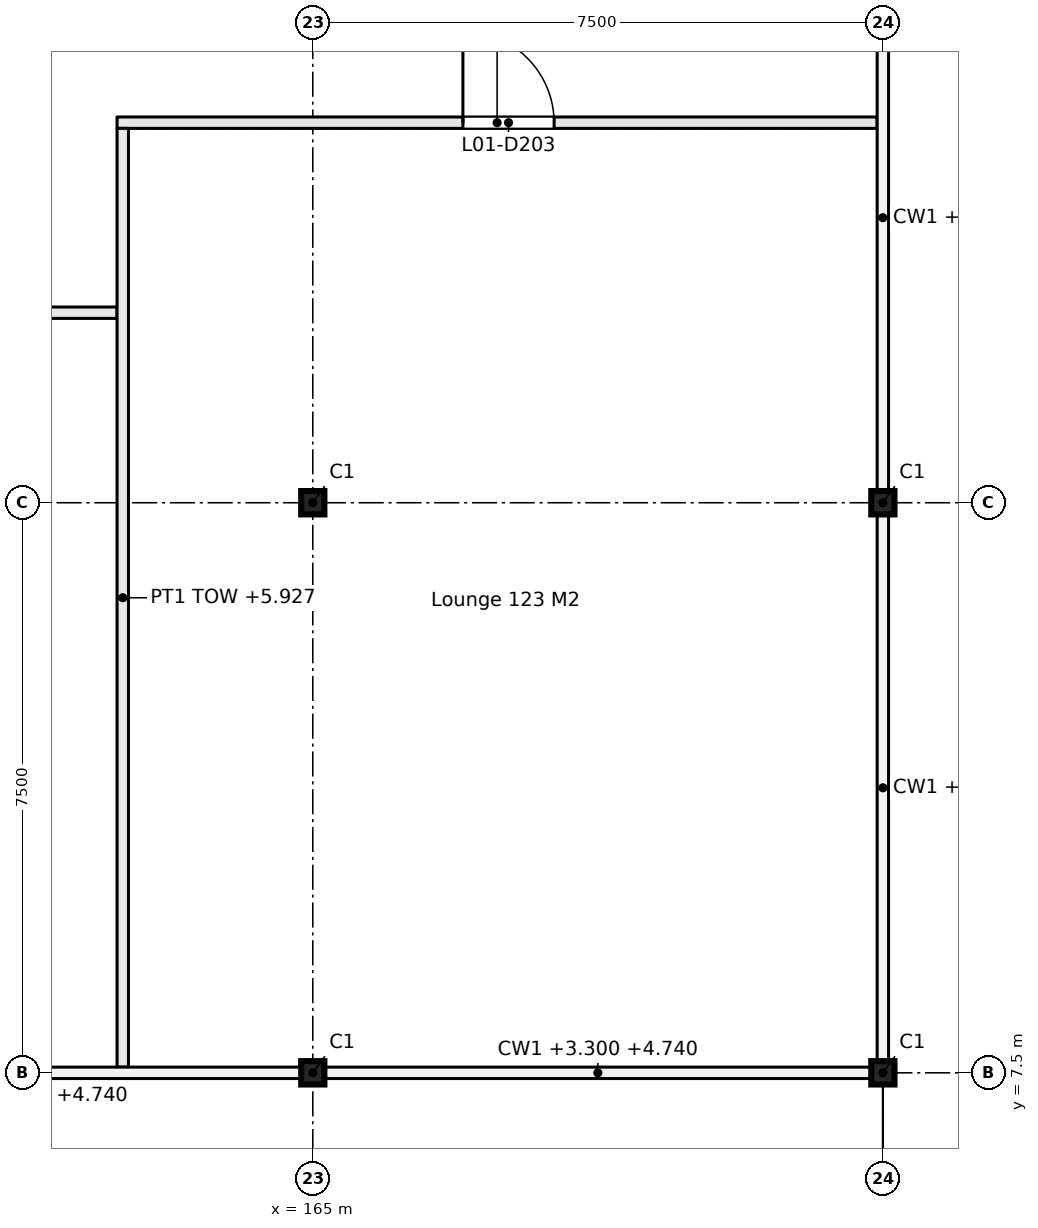
"""IFC4 building model, lengths in metres.
Left out: names, types, materials, properties, quantities, classifications, styles, units other than length and angle.
Written with IfcOpenShell. Run it as: python <this file> out.ifc"""

import sys

from ifc_helpers import new_model, si_unit, direction, frame, frame_2d, origin, origin_2d, place, context, subcontext, project, spatial, rectangle, i_section, extrude, element, fill, save


model = new_model("IFC4")
c1 = context("Model", 3, precision=1e-05, world=origin(), true_north=direction((0.0, 1.0)))
c2 = subcontext(c1, "Body", "Model", "MODEL_VIEW")
j1 = project(units=[si_unit("LENGTHUNIT", "METRE"), si_unit("PLANEANGLEUNIT", "RADIAN")], contexts=[c1])
p1 = place(None, origin())
s1 = spatial("IfcSite", under=j1, at=p1, CompositionType="ELEMENT")
p2 = place(p1, origin())
s2 = spatial("IfcBuilding", under=s1, at=p2, CompositionType="ELEMENT")
p3 = place(p2, frame((0.0, 0.0, 3.3)))
s3 = spatial("IfcBuildingStorey", under=s2, at=p3, CompositionType="ELEMENT", Elevation=3.3)
for number, where, z_axis, x_axis in (
    (1, (165.0, 7.5, 0.0), (0.0, 0.0, 1.0), (1.0, 0.0, 0.0)),
    (2, (165.0, 15.0, 0.0), (0.0, 0.0, 1.0), (1.0, 0.0, 0.0)),
    (3, (172.5, 7.5, 0.0), (0.0, 0.0, 1.0), (1.0, 0.0, 0.0)),
    (4, (172.5, 15.0, 0.0), (0.0, 0.0, 1.0), (1.0, 0.0, 0.0)),
):
    element("IfcColumn", number, at=place(p3, frame(where, z_axis=z_axis, x_axis=x_axis)), inside=s3, PredefinedType="COLUMN", context=c2, shape_type="SweptSolid", body=[
        extrude(i_section(OverallWidth=0.305, OverallDepth=0.307, WebThickness=0.01, FlangeThickness=0.015, FilletRadius=0.015, at=origin_2d()), origin(), (0.0, 0.0, 1.0), 3.3),
    ])
p4 = place(p3, frame((150.125, 17.5, 0.0), z_axis=(0.0, 0.0, 1.0), x_axis=(1.0, 0.0, 0.0)))
e5 = element("IfcWall", 5, at=p4, inside=s3, PredefinedType="PARTITIONING", context=c2, shape_type="SweptSolid", body=[
    extrude(rectangle(XDim=12.3, YDim=0.15, at=frame_2d((6.15, 0.0))), origin(), (0.0, 0.0, 1.0), 2.751),
])
p5 = place(p4, frame((5.425, 0.0, 0.0)))
e6 = element("IfcOpeningElement", 6, at=p5, cuts=e5, PredefinedType="OPENING", context=c2, shape_type="SweptSolid", body=[
    extrude(rectangle(XDim=1.2, YDim=2.1, at=frame_2d((0.6, 1.05))), frame((0.0, 0.085, 0.0), z_axis=(0.0, -1.0, 0.0), x_axis=(1.0, 0.0, 0.0)), (0.0, 0.0, 1.0), 0.17),
])
p6 = place(p3, frame((162.425, 20.0, 0.0), z_axis=(0.0, 0.0, 1.0), x_axis=(1.0, 0.0, 0.0)))
e7 = element("IfcWall", 7, at=p6, inside=s3, PredefinedType="PARTITIONING", context=c2, shape_type="SweptSolid", body=[
    extrude(rectangle(XDim=10.0, YDim=0.15, at=frame_2d((5.0, 0.0))), origin(), (0.0, 0.0, 1.0), 2.751),
])
p7 = place(p6, frame((4.55, 0.0, 0.0)))
e8 = element("IfcOpeningElement", 8, at=p7, cuts=e7, PredefinedType="OPENING", context=c2, shape_type="SweptSolid", body=[
    extrude(rectangle(XDim=1.2, YDim=2.1, at=frame_2d((0.6, 1.05))), frame((0.0, 0.085, 0.0), z_axis=(0.0, -1.0, 0.0), x_axis=(1.0, 0.0, 0.0)), (0.0, 0.0, 1.0), 0.17),
])
p8 = place(p3, frame((162.5, 7.575, 0.0), z_axis=(0.0, 0.0, 1.0), x_axis=(0.0, 1.0, 0.0)))
e9 = element("IfcWall", 9, at=p8, inside=s3, PredefinedType="PARTITIONING", context=c2, shape_type="SweptSolid", body=[
    extrude(rectangle(XDim=12.35, YDim=0.15, at=frame_2d((6.175, 0.0))), origin(), (0.0, 0.0, 1.0), 2.627),
])
p9 = place(p7, origin())
e10 = element("IfcDoor", 10, at=p9, inside=s3, OperationType="DOUBLE_DOOR_SINGLE_SWING", PredefinedType="DOOR", context=c2, shape_type="SweptSolid", body=[
    extrude(rectangle(XDim=1.2, YDim=2.1, at=frame_2d((0.6, 1.05))), frame((0.0, 0.025, 0.0), z_axis=(0.0, -1.0, 0.0), x_axis=(1.0, 0.0, 0.0)), (0.0, 0.0, 1.0), 0.05),
])
fill(e8, e10)
save(model, sys.argv[1])
